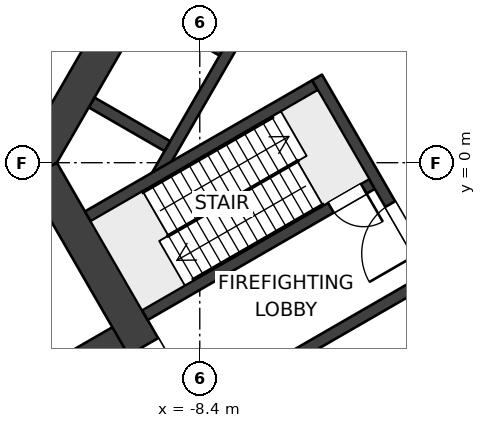
"""IFC4 building model, lengths in metres.
Left out: names, types, materials, properties, quantities, classifications, styles, units other than length and angle.
Written with IfcOpenShell. Run it as: python <this file> out.ifc"""

import sys

from ifc_helpers import new_model, si_unit, direction, frame, frame_2d, origin, place, context, subcontext, project, spatial, polyline, rectangle, outline, extrude, element, fill, save


model = new_model("IFC4")
c1 = context("Model", 3, precision=1e-05, world=origin(), true_north=direction((0.0, 1.0)))
c2 = subcontext(c1, "Body", "Model", "MODEL_VIEW")
j1 = project(units=[si_unit("LENGTHUNIT", "METRE"), si_unit("PLANEANGLEUNIT", "RADIAN")], contexts=[c1])
p1 = place(None, origin())
s1 = spatial("IfcSite", under=j1, at=p1, CompositionType="ELEMENT")
p2 = place(p1, origin())
s2 = spatial("IfcBuilding", under=s1, at=p2, CompositionType="ELEMENT")
p3 = place(p2, frame((0.0, 0.0, 6.0)))
s3 = spatial("IfcBuildingStorey", under=s2, at=p3, CompositionType="ELEMENT", Elevation=6.0)
p4 = place(p3, frame((-6.47, -10.757, 0.0), z_axis=(0.0, 0.0, 1.0), x_axis=(-0.499997612506, 0.8660267822, 0.0)))
e1 = element("IfcWall", 1, at=p4, inside=s3, PredefinedType="SHEAR", context=c2, shape_type="SweptSolid", body=[
    extrude(rectangle(XDim=12.161, YDim=0.9, at=frame_2d((6.08, 0.0))), origin(), (0.0, 0.0, 1.0), 5.0),
])
p5 = place(p4, frame((5.33, 0.0, 0.0)))
e2 = element("IfcOpeningElement", 2, at=p5, cuts=e1, PredefinedType="OPENING", context=c2, shape_type="SweptSolid", body=[
    extrude(rectangle(XDim=1.5, YDim=2.1, at=frame_2d((0.75, 1.05))), frame((0.0, 0.46, 0.0), z_axis=(0.0, -1.0, 0.0), x_axis=(1.0, 0.0, 0.0)), (0.0, 0.0, 1.0), 0.92),
])
p6 = place(p3, origin())
e3 = element("IfcWall", 3, at=p6, inside=s3, PredefinedType="SHEAR", context=c2, shape_type="SweptSolid", body=[
    extrude(outline(polyline([(-6.6, 11.432), (-13.2, 0.0), (-12.94, -0.45), (-12.161, 0.0), (-6.08, 10.531), (-6.08, 11.432), (-6.6, 11.432)])), origin(), (0.0, 0.0, 1.0), 5.0),
])
p7 = place(p3, frame((-0.714, -5.724, 0.0), z_axis=(0.0, 0.0, 1.0), x_axis=(-0.499995050369, 0.866028261437, 0.0)))
e4 = element("IfcWall", 4, at=p7, inside=s3, PredefinedType="SHEAR", context=c2, shape_type="SweptSolid", body=[
    extrude(rectangle(XDim=9.2, YDim=0.3, at=frame_2d((4.6, 0.0))), origin(), (0.0, 0.0, 1.0), 5.0),
])
p8 = place(p7, frame((3.85, 0.0, 0.0)))
e5 = element("IfcOpeningElement", 5, at=p8, cuts=e4, PredefinedType="OPENING", context=c2, shape_type="SweptSolid", body=[
    extrude(rectangle(XDim=1.5, YDim=2.1, at=frame_2d((0.75, 1.05))), frame((0.0, 0.16, 0.0), z_axis=(0.0, -1.0, 0.0), x_axis=(1.0, 0.0, 0.0)), (0.0, 0.0, 1.0), 0.32),
])
p9 = place(p7, frame((1.95, 0.0, 0.0)))
e6 = element("IfcOpeningElement", 6, at=p9, cuts=e4, PredefinedType="OPENING", context=c2, shape_type="SweptSolid", body=[
    extrude(rectangle(XDim=0.9, YDim=2.1, at=frame_2d((0.45, 1.05))), frame((0.0, 0.16, 0.0), z_axis=(0.0, -1.0, 0.0), x_axis=(1.0, 0.0, 0.0)), (0.0, 0.0, 1.0), 0.32),
])
p10 = place(p3, frame((-3.869, -0.559, 0.0), z_axis=(0.0, 0.0, 1.0), x_axis=(-0.86602711848, -0.499997030048, 0.0)))
e7 = element("IfcWall", 7, at=p10, inside=s3, PredefinedType="SHEAR", context=c2, shape_type="SweptSolid", body=[
    extrude(rectangle(XDim=6.901, YDim=0.3, at=frame_2d((3.451, 0.0))), origin(), (0.0, 0.0, 1.0), 5.0),
])
p11 = place(p10, frame((0.25, 0.0, 0.0)))
e8 = element("IfcOpeningElement", 8, at=p11, cuts=e7, PredefinedType="OPENING", context=c2, shape_type="SweptSolid", body=[
    extrude(rectangle(XDim=1.0, YDim=2.1, at=frame_2d((0.5, 1.05))), frame((0.0, 0.16, 0.0), z_axis=(0.0, -1.0, 0.0), x_axis=(1.0, 0.0, 0.0)), (0.0, 0.0, 1.0), 0.32),
])
p12 = place(p3, frame((-5.369, 2.039, 0.0), z_axis=(0.0, 0.0, 1.0), x_axis=(-0.86602711848, -0.499997030048, 0.0)))
e9 = element("IfcWall", 9, at=p12, inside=s3, PredefinedType="SHEAR", context=c2, shape_type="SweptSolid", body=[
    extrude(rectangle(XDim=6.901, YDim=0.3, at=frame_2d((3.451, 0.0))), origin(), (0.0, 0.0, 1.0), 5.0),
])
p13 = place(p3, frame((-2.419, -3.071, 0.0), z_axis=(0.0, 0.0, 1.0), x_axis=(-0.86602711848, -0.499997030048, 0.0)))
e10 = element("IfcWall", 10, at=p13, inside=s3, PredefinedType="SHEAR", context=c2, shape_type="SweptSolid", body=[
    extrude(rectangle(XDim=6.901, YDim=0.3, at=frame_2d((3.451, 0.0))), origin(), (0.0, 0.0, 1.0), 5.0),
])
p14 = place(p13, frame((4.85, 0.0, 0.0)))
e11 = element("IfcOpeningElement", 11, at=p14, cuts=e10, PredefinedType="OPENING", context=c2, shape_type="SweptSolid", body=[
    extrude(rectangle(XDim=1.1, YDim=2.1, at=frame_2d((0.55, 1.05))), frame((0.0, 0.16, 0.0), z_axis=(0.0, -1.0, 0.0), x_axis=(1.0, 0.0, 0.0)), (0.0, 0.0, 1.0), 0.32),
])
p15 = place(p3, frame((-9.548, -0.374, 0.0), z_axis=(0.0, 0.0, 1.0), x_axis=(0.500002290144, 0.866024081565, 0.0)))
e12 = element("IfcWall", 12, at=p15, inside=s3, PredefinedType="SHEAR", context=c2, shape_type="SweptSolid", body=[
    extrude(rectangle(XDim=10.195, YDim=0.3, at=frame_2d((5.098, 0.0))), origin(), (0.0, 0.0, 1.0), 5.0),
])
p16 = place(p3, frame((-9.254, 0.435, 0.0), z_axis=(0.0, 0.0, 1.0), x_axis=(-0.866007057882, 0.500031774688, 0.0)))
e13 = element("IfcWall", 13, at=p16, inside=s3, PredefinedType="SHEAR", context=c2, shape_type="SweptSolid", body=[
    extrude(rectangle(XDim=2.3, YDim=0.3, at=frame_2d((1.15, 0.0))), origin(), (0.0, 0.0, 1.0), 5.0),
])
p17 = place(p3, frame((-7.829, 2.903, 0.0), z_axis=(0.0, 0.0, 1.0), x_axis=(-0.866053019151, 0.499952165731, 0.0)))
e14 = element("IfcWall", 14, at=p17, inside=s3, PredefinedType="SHEAR", context=c2, shape_type="SweptSolid", body=[
    extrude(rectangle(XDim=2.3, YDim=0.2, at=frame_2d((1.15, 0.0))), origin(), (0.0, 0.0, 1.0), 5.0),
])
p18 = place(p3, frame((-10.11, -4.451, 0.0), z_axis=(0.0, 0.0, 1.0), x_axis=(-0.866025284237, -0.500000207062, 0.0)))
e15 = element("IfcWall", 15, at=p18, inside=s3, PredefinedType="SHEAR", context=c2, shape_type="SweptSolid", body=[
    extrude(rectangle(XDim=36.75, YDim=0.8, at=frame_2d((18.375, 0.0))), origin(), (0.0, 0.0, 1.0), 5.0),
])
p19 = place(p18, frame((10.0, 0.0, 0.0)))
e16 = element("IfcOpeningElement", 16, at=p19, cuts=e15, PredefinedType="OPENING", context=c2, shape_type="SweptSolid", body=[
    extrude(rectangle(XDim=1.0, YDim=2.1, at=frame_2d((0.5, 1.05))), frame((0.0, 0.41, 0.0), z_axis=(0.0, -1.0, 0.0), x_axis=(1.0, 0.0, 0.0)), (0.0, 0.0, 1.0), 0.82),
])
p20 = place(p18, frame((2.85, 0.0, 0.0)))
e17 = element("IfcOpeningElement", 17, at=p20, cuts=e15, PredefinedType="OPENING", context=c2, shape_type="SweptSolid", body=[
    extrude(rectangle(XDim=1.2, YDim=2.1, at=frame_2d((0.6, 1.05))), frame((0.0, 0.41, 0.0), z_axis=(0.0, -1.0, 0.0), x_axis=(1.0, 0.0, 0.0)), (0.0, 0.0, 1.0), 0.82),
])
p21 = place(p3, frame((-9.45, 6.495, 0.0), z_axis=(0.0, 0.0, 1.0), x_axis=(-0.866025301493, -0.500000177174, 0.0)))
e18 = element("IfcWall", 18, at=p21, inside=s3, PredefinedType="SOLIDWALL", context=c2, shape_type="SweptSolid", body=[
    extrude(rectangle(XDim=43.095, YDim=0.3, at=frame_2d((21.548, 0.0))), origin(), (0.0, 0.0, 1.0), 4.7),
])
p22 = place(p21, frame((26.595, 0.0, 0.0)))
e19 = element("IfcOpeningElement", 19, at=p22, cuts=e18, PredefinedType="OPENING", context=c2, shape_type="SweptSolid", body=[
    extrude(rectangle(XDim=1.8, YDim=2.4, at=frame_2d((0.9, 1.2))), frame((0.0, 0.16, 0.0), z_axis=(0.0, -1.0, 0.0), x_axis=(1.0, 0.0, 0.0)), (0.0, 0.0, 1.0), 0.32),
])
p23 = place(p8, origin())
e20 = element("IfcDoor", 20, at=p23, inside=s3, OperationType="DOUBLE_DOOR_DOUBLE_SWING", PredefinedType="DOOR", context=c2, shape_type="SweptSolid", body=[
    extrude(rectangle(XDim=1.5, YDim=2.1, at=frame_2d((0.75, 1.05))), frame((0.0, 0.025, 0.0), z_axis=(0.0, -1.0, 0.0), x_axis=(1.0, 0.0, 0.0)), (0.0, 0.0, 1.0), 0.05),
])
fill(e5, e20)
p24 = place(p11, origin())
e21 = element("IfcDoor", 21, at=p24, inside=s3, OperationType="SINGLE_SWING_LEFT", PredefinedType="DOOR", context=c2, shape_type="SweptSolid", body=[
    extrude(rectangle(XDim=1.0, YDim=2.1, at=frame_2d((0.5, 1.05))), frame((0.0, 0.025, 0.0), z_axis=(0.0, -1.0, 0.0), x_axis=(1.0, 0.0, 0.0)), (0.0, 0.0, 1.0), 0.05),
])
fill(e8, e21)
p25 = place(p5, origin())
e22 = element("IfcDoor", 22, at=p25, inside=s3, OperationType="DOUBLE_DOOR_DOUBLE_SWING", PredefinedType="DOOR", context=c2, shape_type="SweptSolid", body=[
    extrude(rectangle(XDim=1.5, YDim=2.1, at=frame_2d((0.75, 1.05))), frame((0.0, 0.025, 0.0), z_axis=(0.0, -1.0, 0.0), x_axis=(1.0, 0.0, 0.0)), (0.0, 0.0, 1.0), 0.05),
])
fill(e2, e22)
save(model, sys.argv[1])
